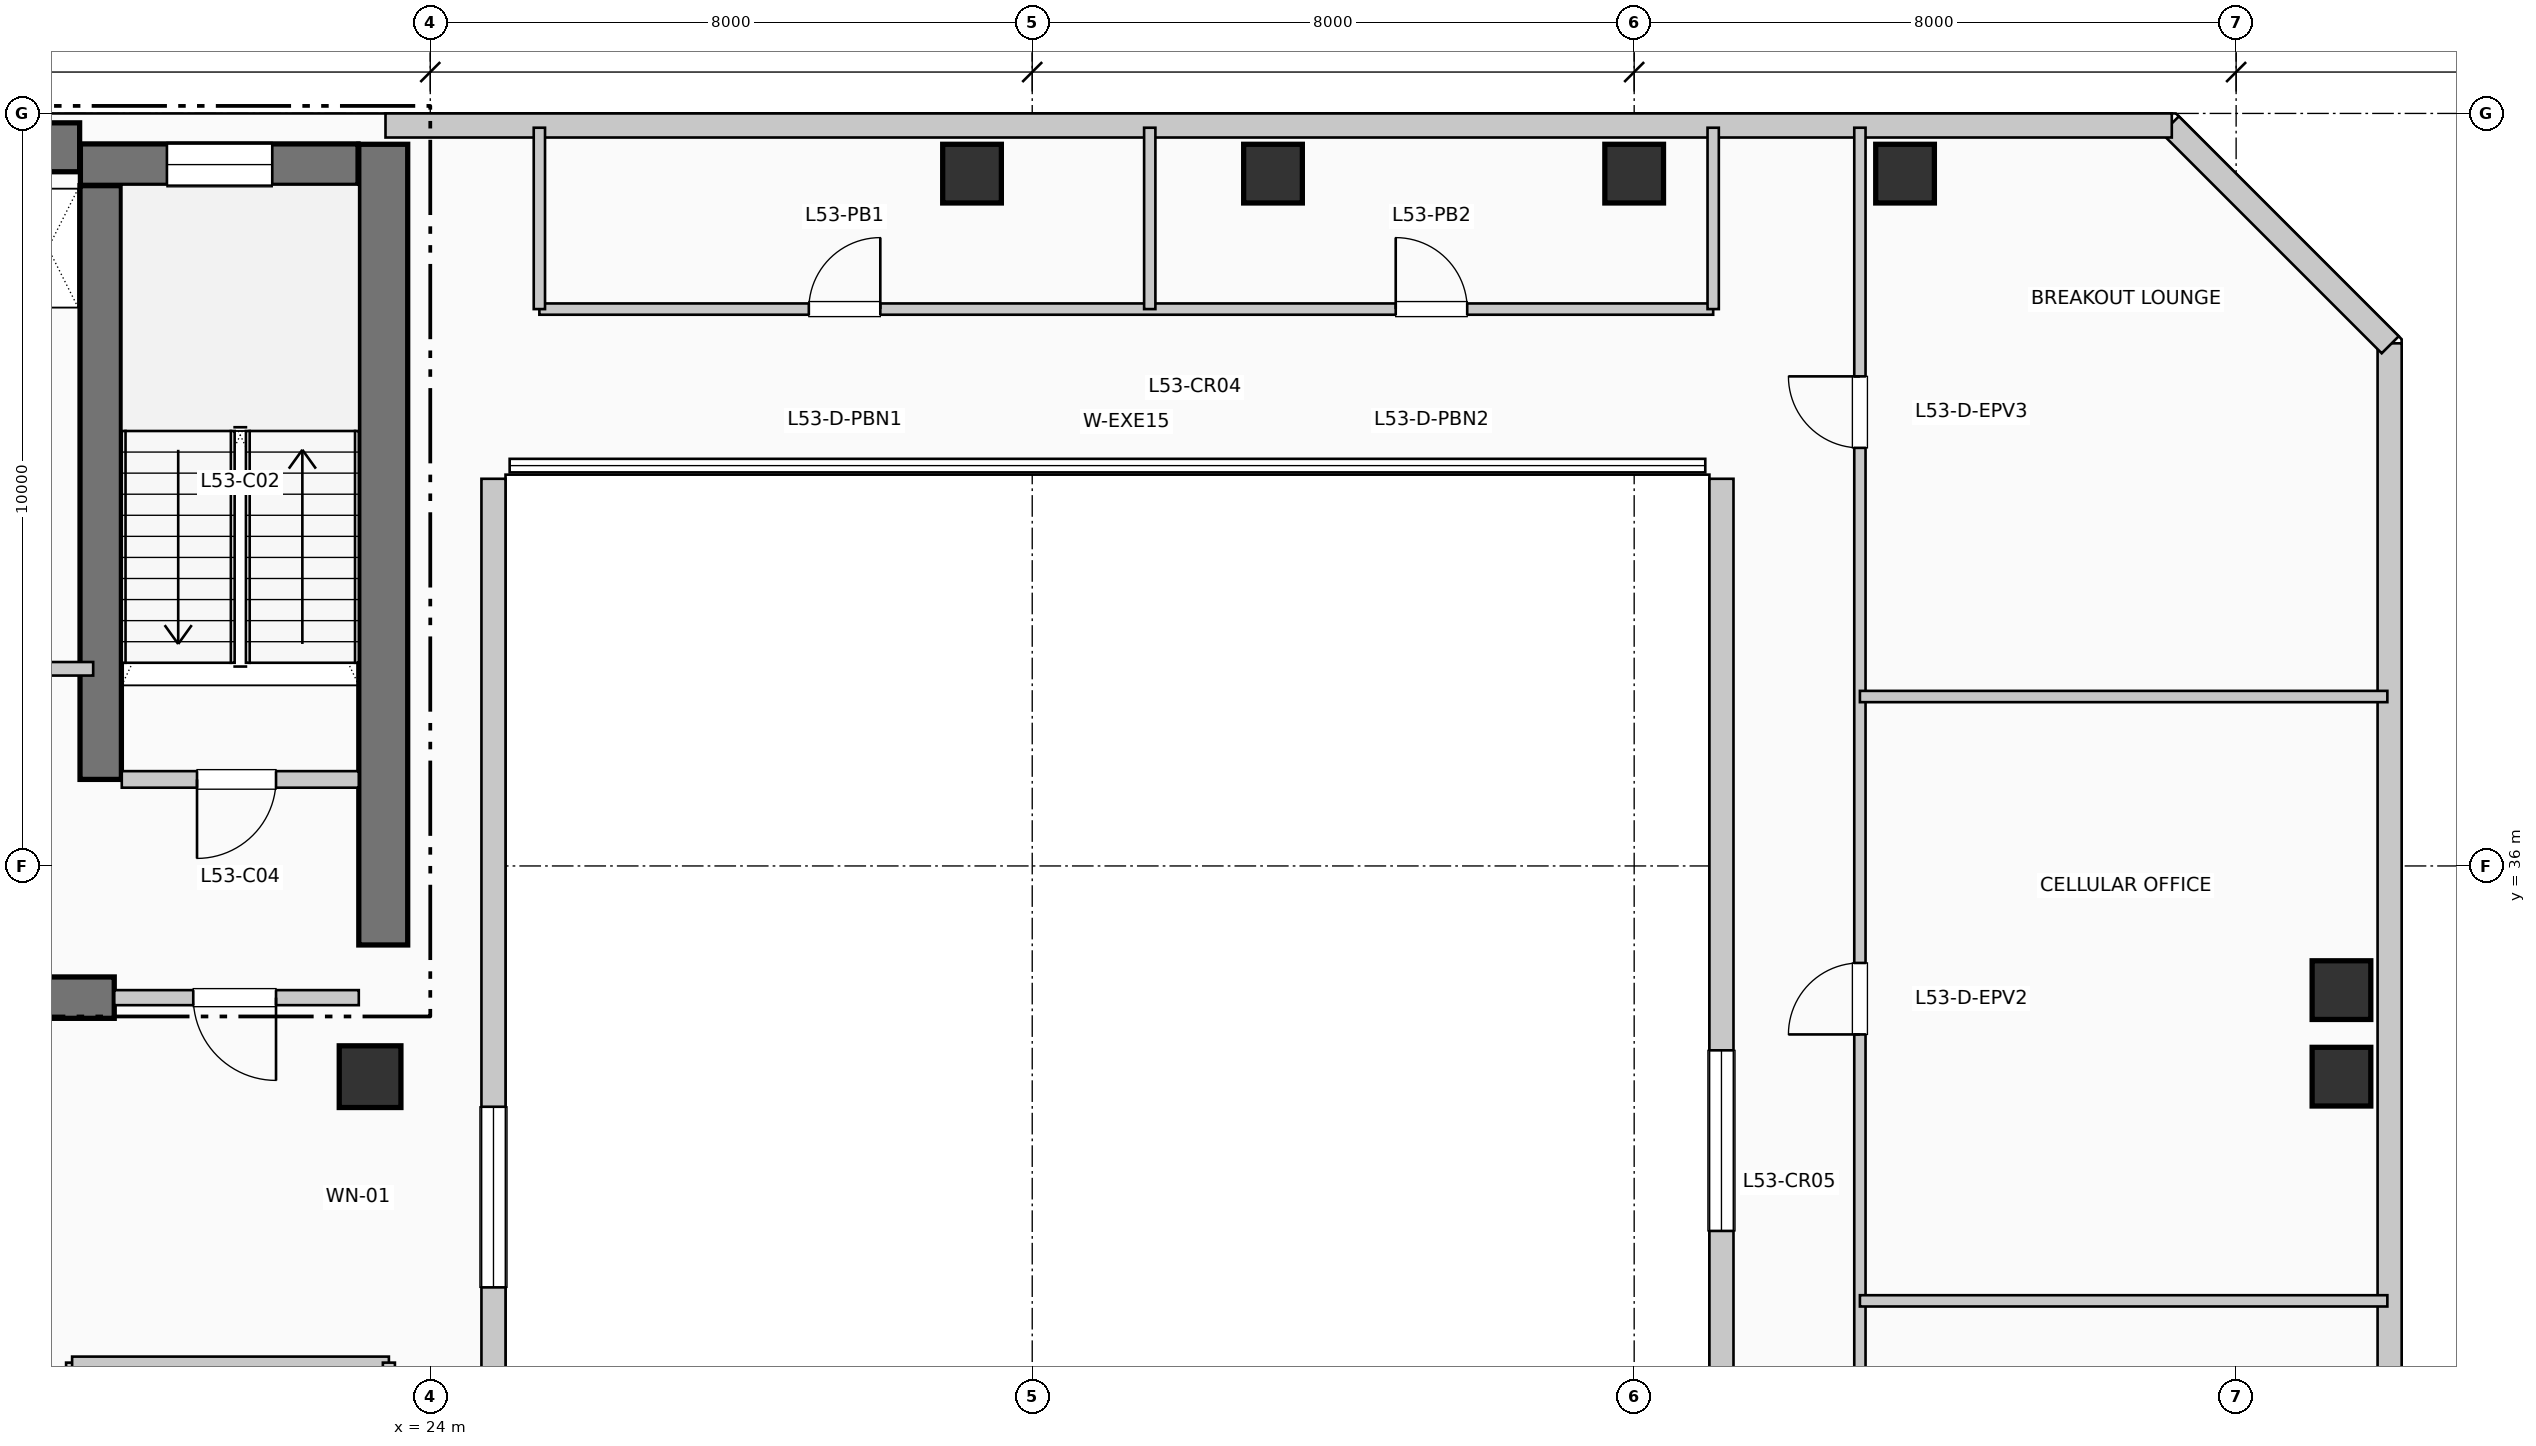
"""IFC4 building model, lengths in metres.
Left out: names, types, materials, properties, quantities, classifications, styles, units other than length and angle.
Written with IfcOpenShell. Run it as: python <this file> out.ifc"""

import sys

from ifc_helpers import new_model, si_unit, direction, frame, frame_2d, origin, origin_2d, place, context, subcontext, project, spatial, rectangle, extrude, element, fill, save


model = new_model("IFC4")
c1 = context("Model", 3, precision=1e-05, world=origin(), true_north=direction((0.0, 1.0)))
c2 = subcontext(c1, "Body", "Model", "MODEL_VIEW")
j1 = project(units=[si_unit("LENGTHUNIT", "METRE"), si_unit("PLANEANGLEUNIT", "RADIAN")], contexts=[c1])
p1 = place(None, origin())
s1 = spatial("IfcSite", under=j1, at=p1, CompositionType="ELEMENT")
p2 = place(p1, origin())
s2 = spatial("IfcBuilding", under=s1, at=p2, CompositionType="ELEMENT")
p3 = place(p2, frame((0.0, 0.0, 219.78)))
s3 = spatial("IfcBuildingStorey", under=s2, at=p3, CompositionType="ELEMENT", Elevation=219.78)
p4 = place(p3, frame((5.36, 45.55, 0.0), z_axis=(0.0, 0.0, 1.0), x_axis=(1.0, 0.0, 0.0)))
e1 = element("IfcWall", 1, at=p4, inside=s3, PredefinedType="SHEAR", context=c2, shape_type="SweptSolid", body=[
    extrude(rectangle(XDim=13.98, YDim=0.65, at=frame_2d((6.99, 0.0))), origin(), (0.0, 0.0, 1.0), 3.96),
])
p5 = place(p3, frame((23.375, 34.95, 0.0), z_axis=(0.0, 0.0, 1.0), x_axis=(0.0, 1.0, 0.0)))
e2 = element("IfcWall", 2, at=p5, inside=s3, PredefinedType="SHEAR", context=c2, shape_type="SweptSolid", body=[
    extrude(rectangle(XDim=10.64, YDim=0.65, at=frame_2d((5.32, 0.0))), origin(), (0.0, 0.0, 1.0), 3.96),
])
p6 = place(p3, frame((13.68, 34.25, 0.0), z_axis=(0.0, 0.0, 1.0), x_axis=(1.0, 0.0, 0.0)))
e3 = element("IfcWall", 3, at=p6, inside=s3, PredefinedType="SHEAR", context=c2, shape_type="SweptSolid", body=[
    extrude(rectangle(XDim=6.12, YDim=0.55, at=frame_2d((3.06, 0.0))), origin(), (0.0, 0.0, 1.0), 3.96),
])
p7 = place(p3, frame((19.62, 37.15, 0.0), z_axis=(0.0, 0.0, 1.0), x_axis=(0.0, 1.0, 0.0)))
e4 = element("IfcWall", 4, at=p7, inside=s3, PredefinedType="SHEAR", context=c2, shape_type="SweptSolid", body=[
    extrude(rectangle(XDim=7.89, YDim=0.55, at=frame_2d((3.945, 0.0))), origin(), (0.0, 0.0, 1.0), 3.96),
])
p8 = place(p3, frame((19.35, 45.32, 0.0), z_axis=(0.0, 0.0, 1.0), x_axis=(1.0, 0.0, 0.0)))
e5 = element("IfcWall", 5, at=p8, inside=s3, PredefinedType="SHEAR", context=c2, shape_type="SweptSolid", body=[
    extrude(rectangle(XDim=3.69, YDim=0.55, at=frame_2d((1.845, 0.0))), origin(), (0.0, 0.0, 1.0), 3.96),
])
p9 = place(p8, frame((1.15, 0.0, 1.05)))
e6 = element("IfcOpeningElement", 6, at=p9, cuts=e5, PredefinedType="OPENING", context=c2, shape_type="SweptSolid", body=[
    extrude(rectangle(XDim=1.4, YDim=1.8, at=frame_2d((0.7, 0.9))), frame((0.0, 0.285, 0.0), z_axis=(0.0, -1.0, 0.0), x_axis=(1.0, 0.0, 0.0)), (0.0, 0.0, 1.0), 0.57),
])
p10 = place(p3, frame((23.2, 33.2, 0.0), z_axis=(0.0, 0.0, 1.0), x_axis=(1.0, 0.0, 0.0)))
e7 = element("IfcColumn", 7, at=p10, inside=s3, PredefinedType="COLUMN", context=c2, shape_type="SweptSolid", body=[
    extrude(rectangle(XDim=0.82, YDim=0.82, at=origin_2d()), origin(), (0.0, 0.0, 1.0), 3.96),
])
for number, where, z_axis, x_axis in (
    (8, (31.2, 45.2, 0.0), (0.0, 0.0, 1.0), (1.0, 0.0, 0.0)),
    (9, (35.2, 45.2, 0.0), (0.0, 0.0, 1.0), (1.0, 0.0, 0.0)),
    (10, (40.0, 45.2, 0.0), (0.0, 0.0, 1.0), (1.0, 0.0, 0.0)),
    (11, (43.6, 45.2, 0.0), (0.0, 0.0, 1.0), (1.0, 0.0, 0.0)),
    (12, (49.4, 33.2, 0.0), (0.0, 0.0, 1.0), (1.0, 0.0, 0.0)),
    (13, (49.4, 34.35, 0.0), (0.0, 0.0, 1.0), (1.0, 0.0, 0.0)),
):
    element("IfcColumn", number, at=place(p3, frame(where, z_axis=z_axis, x_axis=x_axis)), inside=s3, PredefinedType="COLUMN", context=c2, shape_type="SweptSolid", body=[
        extrude(rectangle(XDim=0.78, YDim=0.78, at=origin_2d()), origin(), (0.0, 0.0, 1.0), 3.96),
    ])
p11 = place(p3, frame((24.84, 22.055, 0.0), z_axis=(0.0, 0.0, 1.0), x_axis=(0.0, 1.0, 0.0)))
e14 = element("IfcWall", 14, at=p11, inside=s3, PredefinedType="SOLIDWALL", context=c2, shape_type="SweptSolid", body=[
    extrude(rectangle(XDim=19.09, YDim=0.32, at=frame_2d((9.545, 0.0))), origin(), (0.0, 0.0, 1.0), 3.71),
])
p12 = place(p11, frame((8.345, 0.0, 0.85)))
e15 = element("IfcOpeningElement", 15, at=p12, cuts=e14, PredefinedType="OPENING", context=c2, shape_type="SweptSolid", body=[
    extrude(rectangle(XDim=2.4, YDim=2.05, at=frame_2d((1.2, 1.025))), frame((0.0, 0.17, 0.0), z_axis=(0.0, -1.0, 0.0), x_axis=(1.0, 0.0, 0.0)), (0.0, 0.0, 1.0), 0.34),
])
p13 = place(p3, frame((41.16, 41.145, 0.0), z_axis=(0.0, 0.0, 1.0), x_axis=(0.0, -1.0, 0.0)))
e16 = element("IfcWall", 16, at=p13, inside=s3, PredefinedType="SOLIDWALL", context=c2, shape_type="SweptSolid", body=[
    extrude(rectangle(XDim=17.59, YDim=0.32, at=frame_2d((8.795, 0.0))), origin(), (0.0, 0.0, 1.0), 3.71),
])
p14 = place(p13, frame((7.595, 0.0, 0.85)))
e17 = element("IfcOpeningElement", 17, at=p14, cuts=e16, PredefinedType="OPENING", context=c2, shape_type="SweptSolid", body=[
    extrude(rectangle(XDim=2.4, YDim=2.05, at=frame_2d((1.2, 1.025))), frame((0.0, 0.17, 0.0), z_axis=(0.0, -1.0, 0.0), x_axis=(1.0, 0.0, 0.0)), (0.0, 0.0, 1.0), 0.34),
])
p15 = place(p3, frame((50.04, 25.055, 0.0), z_axis=(0.0, 0.0, 1.0), x_axis=(0.0, 1.0, 0.0)))
e18 = element("IfcWall", 18, at=p15, inside=s3, PredefinedType="SOLIDWALL", context=c2, shape_type="SweptSolid", body=[
    extrude(rectangle(XDim=17.89, YDim=0.32, at=frame_2d((8.945, 0.0))), origin(), (0.0, 0.0, 1.0), 3.71),
])
p16 = place(p3, frame((50.048, 42.926, 0.0), z_axis=(0.0, 0.0, 1.0), x_axis=(-0.707136318428, 0.707077242712, 0.0)))
e19 = element("IfcWall", 19, at=p16, inside=s3, PredefinedType="SOLIDWALL", context=c2, shape_type="SweptSolid", body=[
    extrude(rectangle(XDim=4.133, YDim=0.32, at=frame_2d((2.066, 0.0))), origin(), (0.0, 0.0, 1.0), 3.71),
])
p17 = place(p3, frame((47.145, 45.84, 0.0), z_axis=(0.0, 0.0, 1.0), x_axis=(-1.0, 0.0, 0.0)))
e20 = element("IfcWall", 20, at=p17, inside=s3, PredefinedType="SOLIDWALL", context=c2, shape_type="SweptSolid", body=[
    extrude(rectangle(XDim=23.74, YDim=0.32, at=frame_2d((11.87, 0.0))), origin(), (0.0, 0.0, 1.0), 3.71),
])
p18 = place(p3, frame((19.9, 37.15, 0.0), z_axis=(0.0, 0.0, 1.0), x_axis=(1.0, 0.0, 0.0)))
e21 = element("IfcWall", 21, at=p18, inside=s3, PredefinedType="PARTITIONING", context=c2, shape_type="SweptSolid", body=[
    extrude(rectangle(XDim=3.15, YDim=0.22, at=frame_2d((1.575, 0.0))), origin(), (0.0, 0.0, 1.0), 3.71),
])
p19 = place(p18, frame((2.05, 0.0, 0.0), z_axis=(0.0, 0.0, 1.0), x_axis=(-1.0, 0.0, 0.0)))
e22 = element("IfcOpeningElement", 22, at=p19, cuts=e21, PredefinedType="OPENING", context=c2, shape_type="SweptSolid", body=[
    extrude(rectangle(XDim=1.05, YDim=2.15, at=frame_2d((0.525, 1.075))), frame((0.0, 0.12, 0.0), z_axis=(0.0, -1.0, 0.0), x_axis=(1.0, 0.0, 0.0)), (0.0, 0.0, 1.0), 0.24),
])
p20 = place(p3, frame((19.8, 34.25, 0.0), z_axis=(0.0, 0.0, 1.0), x_axis=(1.0, 0.0, 0.0)))
e23 = element("IfcWall", 23, at=p20, inside=s3, PredefinedType="PARTITIONING", context=c2, shape_type="SweptSolid", body=[
    extrude(rectangle(XDim=3.25, YDim=0.2, at=frame_2d((1.625, 0.0))), origin(), (0.0, 0.0, 1.0), 3.71),
])
p21 = place(p20, frame((2.15, 0.0, 0.0), z_axis=(0.0, 0.0, 1.0), x_axis=(-1.0, 0.0, 0.0)))
e24 = element("IfcOpeningElement", 24, at=p21, cuts=e23, PredefinedType="OPENING", context=c2, shape_type="SweptSolid", body=[
    extrude(rectangle(XDim=1.1, YDim=2.15, at=frame_2d((0.55, 1.075))), frame((0.0, 0.11, 0.0), z_axis=(0.0, -1.0, 0.0), x_axis=(1.0, 0.0, 0.0)), (0.0, 0.0, 1.0), 0.22),
])
p22 = place(p3, frame((17.68, 38.62, 0.0), z_axis=(0.0, 0.0, 1.0), x_axis=(1.0, 0.0, 0.0)))
e25 = element("IfcWall", 25, at=p22, inside=s3, PredefinedType="PARTITIONING", context=c2, shape_type="SweptSolid", body=[
    extrude(rectangle(XDim=1.84, YDim=0.18, at=frame_2d((0.92, 0.0))), origin(), (0.0, 0.0, 1.0), 3.71),
])
p23 = place(p22, frame((0.24, 0.0, 0.0)))
e26 = element("IfcOpeningElement", 26, at=p23, cuts=e25, PredefinedType="OPENING", context=c2, shape_type="SweptSolid", body=[
    extrude(rectangle(XDim=0.92, YDim=2.1, at=frame_2d((0.46, 1.05))), frame((0.0, 0.1, 0.0), z_axis=(0.0, -1.0, 0.0), x_axis=(1.0, 0.0, 0.0)), (0.0, 0.0, 1.0), 0.2),
])
p24 = place(p3, frame((19.24, 12.0, 0.0), z_axis=(0.0, 0.0, 1.0), x_axis=(0.0, 1.0, 0.0)))
e27 = element("IfcWall", 27, at=p24, inside=s3, PredefinedType="PARTITIONING", context=c2, shape_type="SweptSolid", body=[
    extrude(rectangle(XDim=17.4, YDim=0.16, at=frame_2d((8.7, 0.0))), origin(), (0.0, 0.0, 1.0), 3.71),
])
p25 = place(p24, frame((8.225, 0.0, 0.0)))
e28 = element("IfcOpeningElement", 28, at=p25, cuts=e27, PredefinedType="OPENING", context=c2, shape_type="SweptSolid", body=[
    extrude(rectangle(XDim=0.95, YDim=2.15, at=frame_2d((0.475, 1.075))), frame((0.0, 0.09, 0.0), z_axis=(0.0, -1.0, 0.0), x_axis=(1.0, 0.0, 0.0)), (0.0, 0.0, 1.0), 0.18),
])
p26 = place(p3, frame((19.24, 29.4, 0.0), z_axis=(0.0, 0.0, 1.0), x_axis=(1.0, 0.0, 0.0)))
e29 = element("IfcWall", 29, at=p26, inside=s3, PredefinedType="PARTITIONING", context=c2, shape_type="SweptSolid", body=[
    extrude(rectangle(XDim=4.21, YDim=0.16, at=frame_2d((2.105, 0.0))), origin(), (0.0, 0.0, 1.0), 3.365),
])
p27 = place(p3, frame((23.45, 5.99, 0.0), z_axis=(0.0, 0.0, 1.0), x_axis=(0.0, 1.0, 0.0)))
e30 = element("IfcWall", 30, at=p27, inside=s3, PredefinedType="PARTITIONING", context=c2, shape_type="SweptSolid", body=[
    extrude(rectangle(XDim=23.41, YDim=0.16, at=frame_2d((11.705, 0.0))), origin(), (0.0, 0.0, 1.0), 3.095),
])
p28 = place(p3, frame((25.45, 43.4, 0.0), z_axis=(0.0, 0.0, 1.0), x_axis=(1.0, 0.0, 0.0)))
e31 = element("IfcWall", 31, at=p28, inside=s3, PredefinedType="PARTITIONING", context=c2, shape_type="SweptSolid", body=[
    extrude(rectangle(XDim=15.6, YDim=0.15, at=frame_2d((7.8, 0.0))), origin(), (0.0, 0.0, 1.0), 3.71),
])
p29 = place(p28, frame((3.581, 0.0, 0.0)))
e32 = element("IfcOpeningElement", 32, at=p29, cuts=e31, PredefinedType="OPENING", context=c2, shape_type="SweptSolid", body=[
    extrude(rectangle(XDim=0.95, YDim=2.15, at=frame_2d((0.475, 1.075))), frame((0.0, 0.085, 0.0), z_axis=(0.0, -1.0, 0.0), x_axis=(1.0, 0.0, 0.0)), (0.0, 0.0, 1.0), 0.17),
])
p30 = place(p28, frame((11.381, 0.0, 0.0)))
e33 = element("IfcOpeningElement", 33, at=p30, cuts=e31, PredefinedType="OPENING", context=c2, shape_type="SweptSolid", body=[
    extrude(rectangle(XDim=0.95, YDim=2.15, at=frame_2d((0.475, 1.075))), frame((0.0, 0.085, 0.0), z_axis=(0.0, -1.0, 0.0), x_axis=(1.0, 0.0, 0.0)), (0.0, 0.0, 1.0), 0.17),
])
for number, where, z_axis, x_axis in (
    (34, (25.45, 43.4, 0.0), (0.0, 0.0, 1.0), (0.0, 1.0, 0.0)),
    (35, (41.05, 43.4, 0.0), (0.0, 0.0, 1.0), (0.0, 1.0, 0.0)),
    (36, (33.562, 43.4, 0.0), (0.0, 0.0, 1.0), (0.0, 1.0, 0.0)),
):
    element("IfcWall", number, at=place(p3, frame(where, z_axis=z_axis, x_axis=x_axis)), inside=s3, PredefinedType="PARTITIONING", context=c2, shape_type="SweptSolid", body=[
        extrude(rectangle(XDim=2.41, YDim=0.15, at=frame_2d((1.205, 0.0))), origin(), (0.0, 0.0, 1.0), 3.71),
    ])
p31 = place(p3, frame((43.0, 22.19, 0.0), z_axis=(0.0, 0.0, 1.0), x_axis=(0.0, 1.0, 0.0)))
e37 = element("IfcWall", 37, at=p31, inside=s3, PredefinedType="PARTITIONING", context=c2, shape_type="SweptSolid", body=[
    extrude(rectangle(XDim=23.62, YDim=0.15, at=frame_2d((11.81, 0.0))), origin(), (0.0, 0.0, 1.0), 3.71),
])
p32 = place(p31, frame((3.54, 0.0, 0.0)))
e38 = element("IfcOpeningElement", 38, at=p32, cuts=e37, PredefinedType="OPENING", context=c2, shape_type="SweptSolid", body=[
    extrude(rectangle(XDim=0.95, YDim=2.15, at=frame_2d((0.475, 1.075))), frame((0.0, 0.085, 0.0), z_axis=(0.0, -1.0, 0.0), x_axis=(1.0, 0.0, 0.0)), (0.0, 0.0, 1.0), 0.17),
])
p33 = place(p31, frame((11.571, 0.0, 0.0)))
e39 = element("IfcOpeningElement", 39, at=p33, cuts=e37, PredefinedType="OPENING", context=c2, shape_type="SweptSolid", body=[
    extrude(rectangle(XDim=0.95, YDim=2.15, at=frame_2d((0.475, 1.075))), frame((0.0, 0.085, 0.0), z_axis=(0.0, -1.0, 0.0), x_axis=(1.0, 0.0, 0.0)), (0.0, 0.0, 1.0), 0.17),
])
p34 = place(p31, frame((19.366, 0.0, 0.0)))
e40 = element("IfcOpeningElement", 40, at=p34, cuts=e37, PredefinedType="OPENING", context=c2, shape_type="SweptSolid", body=[
    extrude(rectangle(XDim=0.95, YDim=2.15, at=frame_2d((0.475, 1.075))), frame((0.0, 0.085, 0.0), z_axis=(0.0, -1.0, 0.0), x_axis=(1.0, 0.0, 0.0)), (0.0, 0.0, 1.0), 0.17),
])
for number, where, z_axis, x_axis in (
    (41, (43.0, 30.221, 0.0), (0.0, 0.0, 1.0), (1.0, 0.0, 0.0)),
    (42, (43.0, 38.252, 0.0), (0.0, 0.0, 1.0), (1.0, 0.0, 0.0)),
):
    element("IfcWall", number, at=place(p3, frame(where, z_axis=z_axis, x_axis=x_axis)), inside=s3, PredefinedType="PARTITIONING", context=c2, shape_type="SweptSolid", body=[
        extrude(rectangle(XDim=7.01, YDim=0.15, at=frame_2d((3.505, 0.0))), origin(), (0.0, 0.0, 1.0), 3.71),
    ])
p35 = place(p9, origin())
e43 = element("IfcWindow", 43, at=p35, inside=s3, PartitioningType="SINGLE_PANEL", PredefinedType="WINDOW", context=c2, shape_type="SweptSolid", body=[
    extrude(rectangle(XDim=1.4, YDim=1.8, at=frame_2d((0.7, 0.9))), frame((0.0, 0.03, 0.0), z_axis=(0.0, -1.0, 0.0), x_axis=(1.0, 0.0, 0.0)), (0.0, 0.0, 1.0), 0.06),
])
fill(e6, e43)
p36 = place(p12, origin())
e44 = element("IfcWindow", 44, at=p36, inside=s3, PartitioningType="SINGLE_PANEL", PredefinedType="WINDOW", context=c2, shape_type="SweptSolid", body=[
    extrude(rectangle(XDim=2.4, YDim=2.05, at=frame_2d((1.2, 1.025))), frame((0.0, 0.03, 0.0), z_axis=(0.0, -1.0, 0.0), x_axis=(1.0, 0.0, 0.0)), (0.0, 0.0, 1.0), 0.06),
])
fill(e15, e44)
p37 = place(p14, origin())
e45 = element("IfcWindow", 45, at=p37, inside=s3, PartitioningType="SINGLE_PANEL", PredefinedType="WINDOW", context=c2, shape_type="SweptSolid", body=[
    extrude(rectangle(XDim=2.4, YDim=2.05, at=frame_2d((1.2, 1.025))), frame((0.0, 0.03, 0.0), z_axis=(0.0, -1.0, 0.0), x_axis=(1.0, 0.0, 0.0)), (0.0, 0.0, 1.0), 0.06),
])
fill(e17, e45)
p38 = place(p19, origin())
e46 = element("IfcDoor", 46, at=p38, inside=s3, OperationType="SINGLE_SWING_LEFT", PredefinedType="DOOR", context=c2, shape_type="SweptSolid", body=[
    extrude(rectangle(XDim=1.05, YDim=2.15, at=frame_2d((0.525, 1.075))), frame((0.0, 0.025, 0.0), z_axis=(0.0, -1.0, 0.0), x_axis=(1.0, 0.0, 0.0)), (0.0, 0.0, 1.0), 0.05),
])
fill(e22, e46)
p39 = place(p21, origin())
e47 = element("IfcDoor", 47, at=p39, inside=s3, OperationType="SINGLE_SWING_RIGHT", PredefinedType="DOOR", context=c2, shape_type="SweptSolid", body=[
    extrude(rectangle(XDim=1.1, YDim=2.15, at=frame_2d((0.55, 1.075))), frame((0.0, 0.025, 0.0), z_axis=(0.0, -1.0, 0.0), x_axis=(1.0, 0.0, 0.0)), (0.0, 0.0, 1.0), 0.05),
])
fill(e24, e47)
p40 = place(p29, origin())
e48 = element("IfcDoor", 48, at=p40, inside=s3, OperationType="SINGLE_SWING_RIGHT", PredefinedType="DOOR", context=c2, shape_type="SweptSolid", body=[
    extrude(rectangle(XDim=0.95, YDim=2.15, at=frame_2d((0.475, 1.075))), frame((0.0, 0.025, 0.0), z_axis=(0.0, -1.0, 0.0), x_axis=(1.0, 0.0, 0.0)), (0.0, 0.0, 1.0), 0.05),
])
fill(e32, e48)
p41 = place(p30, origin())
e49 = element("IfcDoor", 49, at=p41, inside=s3, OperationType="SINGLE_SWING_LEFT", PredefinedType="DOOR", context=c2, shape_type="SweptSolid", body=[
    extrude(rectangle(XDim=0.95, YDim=2.15, at=frame_2d((0.475, 1.075))), frame((0.0, 0.025, 0.0), z_axis=(0.0, -1.0, 0.0), x_axis=(1.0, 0.0, 0.0)), (0.0, 0.0, 1.0), 0.05),
])
fill(e33, e49)
p42 = place(p33, origin())
e50 = element("IfcDoor", 50, at=p42, inside=s3, OperationType="SINGLE_SWING_LEFT", PredefinedType="DOOR", context=c2, shape_type="SweptSolid", body=[
    extrude(rectangle(XDim=0.95, YDim=2.15, at=frame_2d((0.475, 1.075))), frame((0.0, 0.025, 0.0), z_axis=(0.0, -1.0, 0.0), x_axis=(1.0, 0.0, 0.0)), (0.0, 0.0, 1.0), 0.05),
])
fill(e39, e50)
p43 = place(p34, origin())
e51 = element("IfcDoor", 51, at=p43, inside=s3, OperationType="SINGLE_SWING_RIGHT", PredefinedType="DOOR", context=c2, shape_type="SweptSolid", body=[
    extrude(rectangle(XDim=0.95, YDim=2.15, at=frame_2d((0.475, 1.075))), frame((0.0, 0.025, 0.0), z_axis=(0.0, -1.0, 0.0), x_axis=(1.0, 0.0, 0.0)), (0.0, 0.0, 1.0), 0.05),
])
fill(e40, e51)
save(model, sys.argv[1])
